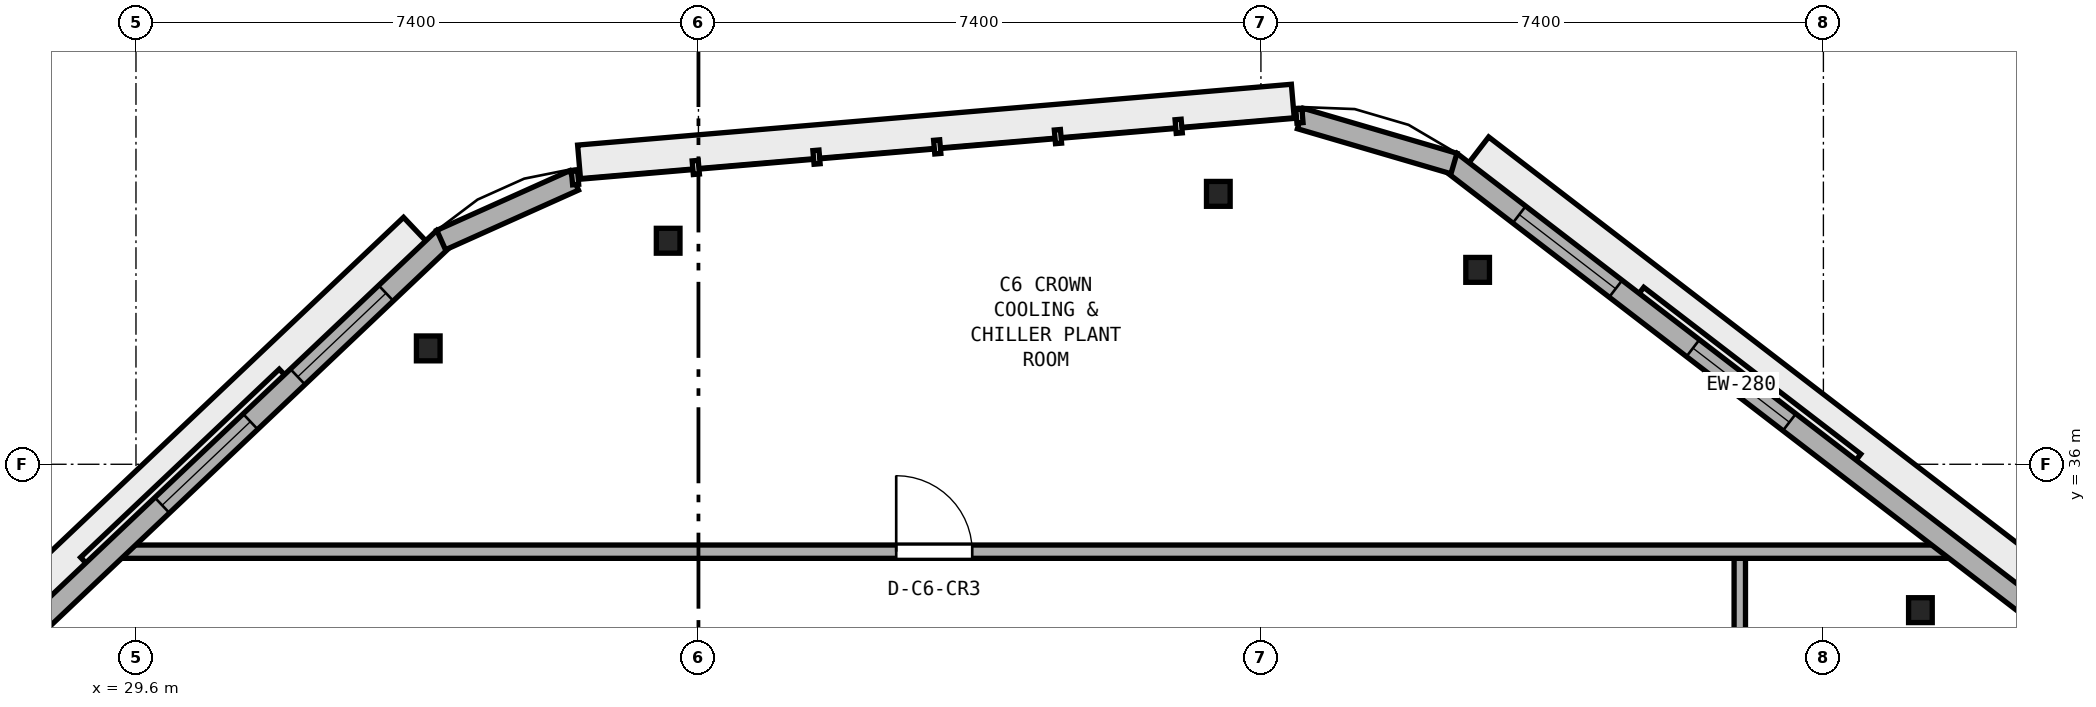
"""IFC4 building model, lengths in metres.
Left out: names, types, materials, properties, quantities, classifications, styles, units other than length and angle.
Written with IfcOpenShell. Run it as: python <this file> out.ifc"""

import sys

from ifc_helpers import new_model, si_unit, direction, frame, frame_2d, origin, origin_2d, place, context, subcontext, project, spatial, rectangle, i_section, extrude, element, fill, save


model = new_model("IFC4")
c1 = context("Model", 3, precision=1e-05, world=origin(), true_north=direction((0.0, 1.0)))
c2 = subcontext(c1, "Body", "Model", "MODEL_VIEW")
j1 = project(units=[si_unit("LENGTHUNIT", "METRE"), si_unit("PLANEANGLEUNIT", "RADIAN")], contexts=[c1])
p1 = place(None, origin())
s1 = spatial("IfcSite", under=j1, at=p1, CompositionType="ELEMENT")
p2 = place(p1, origin())
s2 = spatial("IfcBuilding", under=s1, at=p2, CompositionType="ELEMENT")
p3 = place(p2, frame((0.0, 0.0, 333.4)))
s3 = spatial("IfcBuildingStorey", under=s2, at=p3, CompositionType="ELEMENT", Elevation=333.4)
for number, where, z_axis, x_axis in (
    (1, (53.076, 34.081, 0.0), (0.0, 0.0, 1.0), (1.0, 0.0, 0.0)),
    (2, (47.251, 38.558, 0.0), (0.0, 0.0, 1.0), (1.0, 0.0, 0.0)),
    (3, (43.84, 39.557, 0.0), (0.0, 0.0, 1.0), (1.0, 0.0, 0.0)),
    (4, (36.602, 38.941, 0.0), (0.0, 0.0, 1.0), (1.0, 0.0, 0.0)),
    (5, (33.445, 37.524, 0.0), (0.0, 0.0, 1.0), (1.0, 0.0, 0.0)),
):
    element("IfcColumn", number, at=place(p3, frame(where, z_axis=z_axis, x_axis=x_axis)), inside=s3, PredefinedType="COLUMN", context=c2, shape_type="SweptSolid", body=[
        extrude(i_section(OverallWidth=0.311, OverallDepth=0.327, WebThickness=0.016, FlangeThickness=0.025, at=origin_2d()), origin(), (0.0, 0.0, 1.0), 4.0),
    ])
p4 = place(p3, frame((50.7, 15.55, 0.0), z_axis=(0.0, 0.0, 1.0), x_axis=(0.0, 1.0, 0.0)))
e6 = element("IfcWall", 6, at=p4, inside=s3, PredefinedType="PARTITIONING", context=c2, shape_type="SweptSolid", body=[
    extrude(rectangle(XDim=19.3, YDim=0.15, at=frame_2d((9.65, 0.0))), origin(), (0.0, 0.0, 1.0), 3.7),
])
p5 = place(p4, frame((9.15, 0.0, 0.0)))
e7 = element("IfcOpeningElement", 7, at=p5, cuts=e6, PredefinedType="OPENING", context=c2, shape_type="SweptSolid", body=[
    extrude(rectangle(XDim=1.0, YDim=2.12, at=frame_2d((0.5, 1.06))), frame((0.0, 0.085, 0.0), z_axis=(0.0, -1.0, 0.0), x_axis=(1.0, 0.0, 0.0)), (0.0, 0.0, 1.0), 0.17),
])
p6 = place(p3, frame((29.236, 34.85, 0.0), z_axis=(0.0, 0.0, 1.0), x_axis=(1.0, 0.0, 0.0)))
e8 = element("IfcWall", 8, at=p6, inside=s3, PredefinedType="PARTITIONING", context=c2, shape_type="SweptSolid", body=[
    extrude(rectangle(XDim=24.422, YDim=0.175, at=frame_2d((12.211, 0.0))), origin(), (0.0, 0.0, 1.0), 3.7),
])
p7 = place(p6, frame((10.365, 0.0, 0.0)))
e9 = element("IfcOpeningElement", 9, at=p7, cuts=e8, PredefinedType="OPENING", context=c2, shape_type="SweptSolid", body=[
    extrude(rectangle(XDim=1.0, YDim=2.12, at=frame_2d((0.5, 1.06))), frame((0.0, 0.097, 0.0), z_axis=(0.0, -1.0, 0.0), x_axis=(1.0, 0.0, 0.0)), (0.0, 0.0, 1.0), 0.195),
])
p8 = place(p3, frame((54.543, 34.102, 0.0), z_axis=(0.0, 0.0, 1.0), x_axis=(-0.792926835332, 0.609316858302, 0.0)))
e10 = element("IfcWall", 10, at=p8, inside=s3, PredefinedType="STANDARD", context=c2, shape_type="SweptSolid", body=[
    extrude(rectangle(XDim=9.647, YDim=0.28, at=frame_2d((4.823, 0.0))), origin(), (0.0, 0.0, 1.0), 3.7),
])
p9 = place(p8, frame((4.023, 0.0, 0.9)))
e11 = element("IfcOpeningElement", 11, at=p9, cuts=e10, PredefinedType="OPENING", context=c2, shape_type="SweptSolid", body=[
    extrude(rectangle(XDim=1.6, YDim=1.45, at=frame_2d((0.8, 0.725))), frame((0.0, 0.15, 0.0), z_axis=(0.0, -1.0, 0.0), x_axis=(1.0, 0.0, 0.0)), (0.0, 0.0, 1.0), 0.3),
])
p10 = place(p8, frame((6.906, 0.0, 0.9)))
e12 = element("IfcOpeningElement", 12, at=p10, cuts=e10, PredefinedType="OPENING", context=c2, shape_type="SweptSolid", body=[
    extrude(rectangle(XDim=1.6, YDim=1.45, at=frame_2d((0.8, 0.725))), frame((0.0, 0.15, 0.0), z_axis=(0.0, -1.0, 0.0), x_axis=(1.0, 0.0, 0.0)), (0.0, 0.0, 1.0), 0.3),
])
p11 = place(p3, frame((33.654, 38.976, 0.0), z_axis=(0.0, 0.0, 1.0), x_axis=(-0.72588023988, -0.687821108539, 0.0)))
e13 = element("IfcWall", 13, at=p11, inside=s3, PredefinedType="STANDARD", context=c2, shape_type="SweptSolid", body=[
    extrude(rectangle(XDim=9.122, YDim=0.28, at=frame_2d((4.561, 0.0))), origin(), (0.0, 0.0, 1.0), 3.7),
])
p12 = place(p11, frame((1.054, 0.0, 0.9)))
e14 = element("IfcOpeningElement", 14, at=p12, cuts=e13, PredefinedType="OPENING", context=c2, shape_type="SweptSolid", body=[
    extrude(rectangle(XDim=1.6, YDim=1.45, at=frame_2d((0.8, 0.725))), frame((0.0, 0.15, 0.0), z_axis=(0.0, -1.0, 0.0), x_axis=(1.0, 0.0, 0.0)), (0.0, 0.0, 1.0), 0.3),
])
p13 = place(p11, frame((3.511, 0.0, 0.9)))
e15 = element("IfcOpeningElement", 15, at=p13, cuts=e13, PredefinedType="OPENING", context=c2, shape_type="SweptSolid", body=[
    extrude(rectangle(XDim=1.6, YDim=1.45, at=frame_2d((0.8, 0.725))), frame((0.0, 0.15, 0.0), z_axis=(0.0, -1.0, 0.0), x_axis=(1.0, 0.0, 0.0)), (0.0, 0.0, 1.0), 0.3),
])
p14 = place(p3, frame((46.939, 39.957, 0.0), z_axis=(0.0, 0.0, 1.0), x_axis=(-0.959642034911, 0.28122440298, 0.0)))
e16 = element("IfcWall", 16, at=p14, inside=s3, PredefinedType="STANDARD", context=c2, shape_type="SweptSolid", body=[
    extrude(rectangle(XDim=2.105, YDim=0.28, at=frame_2d((1.053, 0.0))), origin(), (0.0, 0.0, 1.0), 3.7),
])
p15 = place(p3, frame((35.365, 39.735, 0.0), z_axis=(0.0, 0.0, 1.0), x_axis=(-0.912383094529, -0.409337377744, 0.0)))
e17 = element("IfcWall", 17, at=p15, inside=s3, PredefinedType="STANDARD", context=c2, shape_type="SweptSolid", body=[
    extrude(rectangle(XDim=1.917, YDim=0.28, at=frame_2d((0.959, 0.0))), origin(), (0.0, 0.0, 1.0), 3.7),
])
p16 = place(p7, origin())
e18 = element("IfcDoor", 18, at=p16, inside=s3, OperationType="SINGLE_SWING_LEFT", PredefinedType="DOOR", context=c2, shape_type="SweptSolid", body=[
    extrude(rectangle(XDim=1.0, YDim=2.12, at=frame_2d((0.5, 1.06))), frame((0.0, 0.025, 0.0), z_axis=(0.0, -1.0, 0.0), x_axis=(1.0, 0.0, 0.0)), (0.0, 0.0, 1.0), 0.05),
])
fill(e9, e18)
p17 = place(p9, origin())
e19 = element("IfcWindow", 19, at=p17, inside=s3, PartitioningType="SINGLE_PANEL", PredefinedType="WINDOW", context=c2, shape_type="SweptSolid", body=[
    extrude(rectangle(XDim=1.6, YDim=1.45, at=frame_2d((0.8, 0.725))), frame((0.0, 0.03, 0.0), z_axis=(0.0, -1.0, 0.0), x_axis=(1.0, 0.0, 0.0)), (0.0, 0.0, 1.0), 0.06),
])
fill(e11, e19)
p18 = place(p10, origin())
e20 = element("IfcWindow", 20, at=p18, inside=s3, PartitioningType="SINGLE_PANEL", PredefinedType="WINDOW", context=c2, shape_type="SweptSolid", body=[
    extrude(rectangle(XDim=1.6, YDim=1.45, at=frame_2d((0.8, 0.725))), frame((0.0, 0.03, 0.0), z_axis=(0.0, -1.0, 0.0), x_axis=(1.0, 0.0, 0.0)), (0.0, 0.0, 1.0), 0.06),
])
fill(e12, e20)
p19 = place(p12, origin())
e21 = element("IfcWindow", 21, at=p19, inside=s3, PartitioningType="SINGLE_PANEL", PredefinedType="WINDOW", context=c2, shape_type="SweptSolid", body=[
    extrude(rectangle(XDim=1.6, YDim=1.45, at=frame_2d((0.8, 0.725))), frame((0.0, 0.03, 0.0), z_axis=(0.0, -1.0, 0.0), x_axis=(1.0, 0.0, 0.0)), (0.0, 0.0, 1.0), 0.06),
])
fill(e14, e21)
p20 = place(p13, origin())
e22 = element("IfcWindow", 22, at=p20, inside=s3, PartitioningType="SINGLE_PANEL", PredefinedType="WINDOW", context=c2, shape_type="SweptSolid", body=[
    extrude(rectangle(XDim=1.6, YDim=1.45, at=frame_2d((0.8, 0.725))), frame((0.0, 0.03, 0.0), z_axis=(0.0, -1.0, 0.0), x_axis=(1.0, 0.0, 0.0)), (0.0, 0.0, 1.0), 0.06),
])
fill(e15, e22)
save(model, sys.argv[1])
